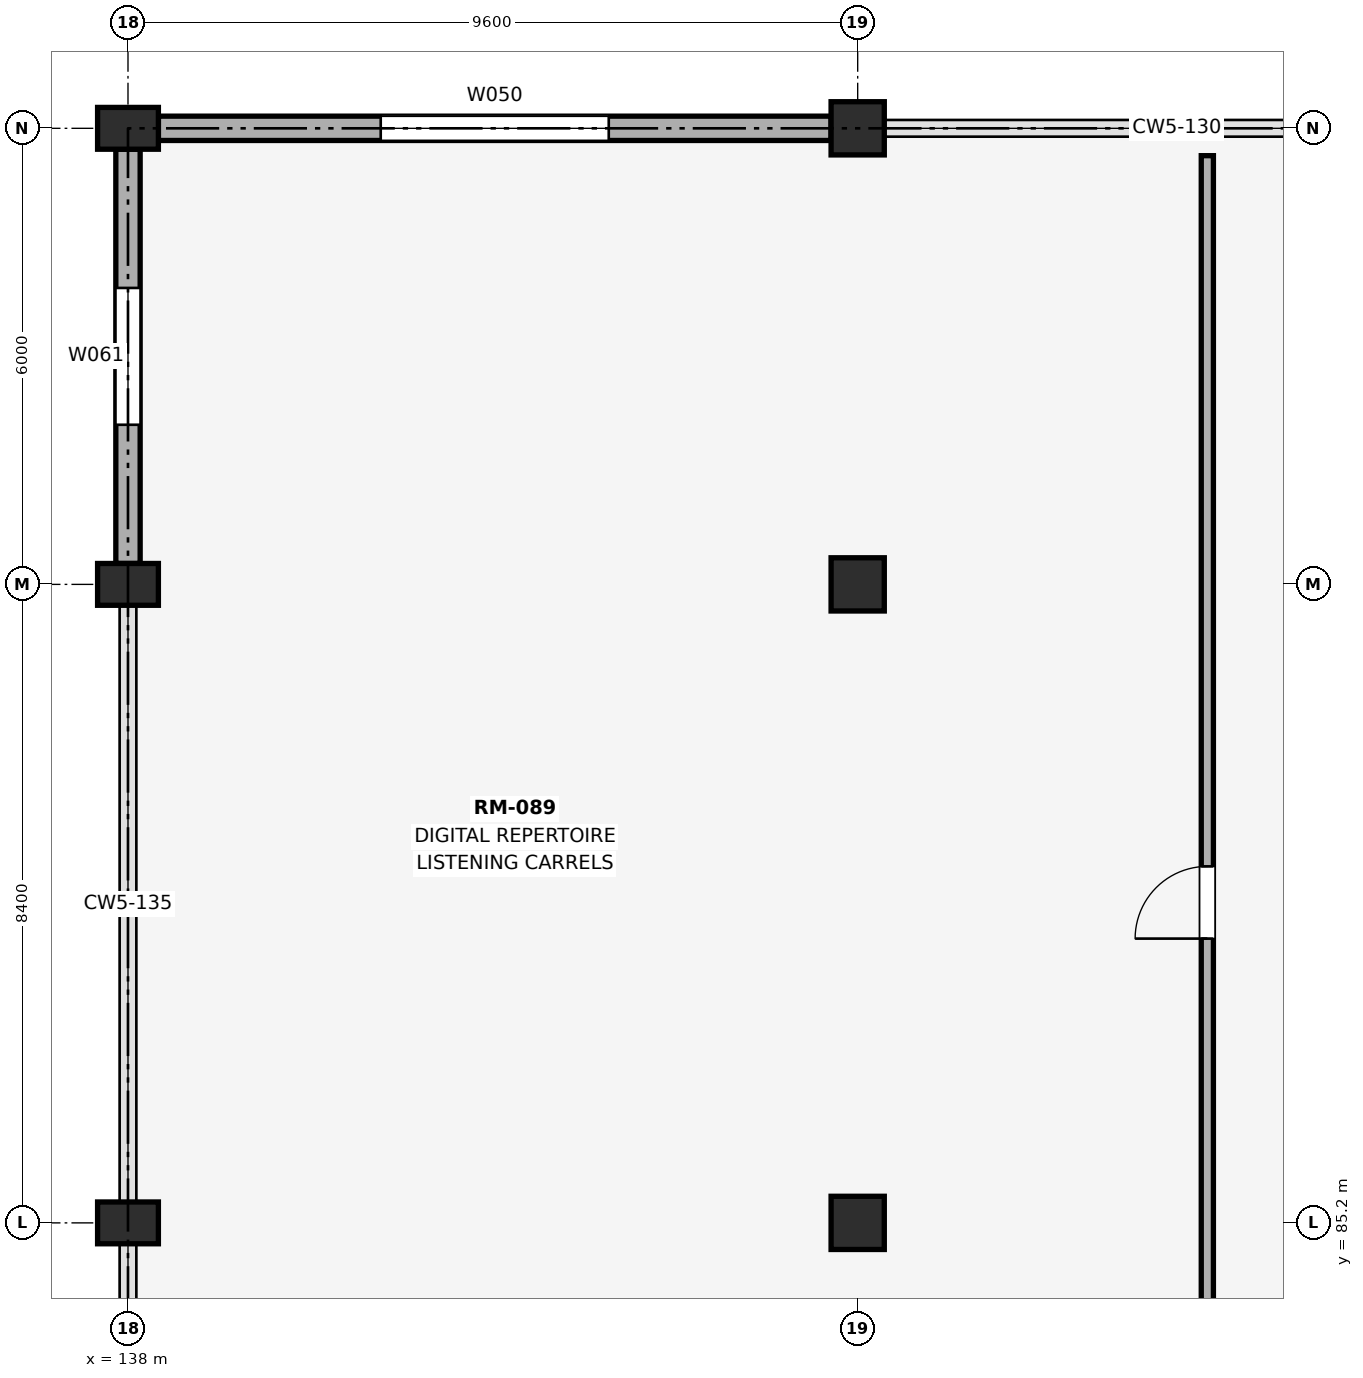
"""IFC4 building model, lengths in metres.
Left out: names, types, materials, properties, quantities, classifications, styles, units other than length and angle.
Written with IfcOpenShell. Run it as: python <this file> out.ifc"""

import sys

from ifc_helpers import new_model, si_unit, direction, frame, frame_2d, origin, origin_2d, place, context, subcontext, project, spatial, rectangle, extrude, element, fill, save


model = new_model("IFC4")
c1 = context("Model", 3, precision=1e-05, world=origin(), true_north=direction((0.0, 1.0)))
c2 = subcontext(c1, "Body", "Model", "MODEL_VIEW")
j1 = project(units=[si_unit("LENGTHUNIT", "METRE"), si_unit("PLANEANGLEUNIT", "RADIAN")], contexts=[c1])
p1 = place(None, origin())
s1 = spatial("IfcSite", under=j1, at=p1, CompositionType="ELEMENT")
p2 = place(p1, origin())
s2 = spatial("IfcBuilding", under=s1, at=p2, CompositionType="ELEMENT")
p3 = place(p2, frame((0.0, 0.0, 5.4)))
s3 = spatial("IfcBuildingStorey", under=s2, at=p3, CompositionType="ELEMENT", Elevation=5.4)
for number, where, z_axis, x_axis in (
    (1, (138.0, 85.2, 0.0), (0.0, 0.0, 1.0), (1.0, 0.0, 0.0)),
    (2, (138.0, 93.6, 0.0), (0.0, 0.0, 1.0), (1.0, 0.0, 0.0)),
    (3, (138.0, 99.6, 0.0), (0.0, 0.0, 1.0), (1.0, 0.0, 0.0)),
):
    element("IfcColumn", number, at=place(p3, frame(where, z_axis=z_axis, x_axis=x_axis)), inside=s3, PredefinedType="COLUMN", context=c2, shape_type="SweptSolid", body=[
        extrude(rectangle(XDim=0.8, YDim=0.55, at=origin_2d()), origin(), (0.0, 0.0, 1.0), 4.8),
    ])
for number, where, z_axis, x_axis in (
    (4, (147.6, 85.2, 0.0), (0.0, 0.0, 1.0), (1.0, 0.0, 0.0)),
    (5, (147.6, 93.6, 0.0), (0.0, 0.0, 1.0), (1.0, 0.0, 0.0)),
    (6, (147.6, 99.6, 0.0), (0.0, 0.0, 1.0), (1.0, 0.0, 0.0)),
):
    element("IfcColumn", number, at=place(p3, frame(where, z_axis=z_axis, x_axis=x_axis)), inside=s3, PredefinedType="COLUMN", context=c2, shape_type="SweptSolid", body=[
        extrude(rectangle(XDim=0.7, YDim=0.7, at=origin_2d()), origin(), (0.0, 0.0, 1.0), 4.8),
    ])
p4 = place(p3, frame((138.4, 99.6, 0.0), z_axis=(0.0, 0.0, 1.0), x_axis=(1.0, 0.0, 0.0)))
e7 = element("IfcWall", 7, at=p4, inside=s3, PredefinedType="SOLIDWALL", context=c2, shape_type="SweptSolid", body=[
    extrude(rectangle(XDim=8.85, YDim=0.32, at=frame_2d((4.425, 0.0))), origin(), (0.0, 0.0, 1.0), 3.48),
])
p5 = place(p4, frame((2.925, 0.0, 0.95)))
e8 = element("IfcOpeningElement", 8, at=p5, cuts=e7, PredefinedType="OPENING", context=c2, shape_type="SweptSolid", body=[
    extrude(rectangle(XDim=3.0, YDim=1.8, at=frame_2d((1.5, 0.9))), frame((0.0, 0.17, 0.0), z_axis=(0.0, -1.0, 0.0), x_axis=(1.0, 0.0, 0.0)), (0.0, 0.0, 1.0), 0.34),
])
p6 = place(p3, frame((138.0, 93.875, 0.0), z_axis=(0.0, 0.0, 1.0), x_axis=(0.0, 1.0, 0.0)))
e9 = element("IfcWall", 9, at=p6, inside=s3, PredefinedType="SOLIDWALL", context=c2, shape_type="SweptSolid", body=[
    extrude(rectangle(XDim=5.45, YDim=0.32, at=frame_2d((2.725, 0.0))), origin(), (0.0, 0.0, 1.0), 3.8),
])
p7 = place(p6, frame((1.825, 0.0, 0.9)))
e10 = element("IfcOpeningElement", 10, at=p7, cuts=e9, PredefinedType="OPENING", context=c2, shape_type="SweptSolid", body=[
    extrude(rectangle(XDim=1.8, YDim=1.8, at=frame_2d((0.9, 0.9))), frame((0.0, 0.17, 0.0), z_axis=(0.0, -1.0, 0.0), x_axis=(1.0, 0.0, 0.0)), (0.0, 0.0, 1.0), 0.34),
])
p8 = place(p3, frame((152.2, 69.94, 0.0), z_axis=(0.0, 0.0, 1.0), x_axis=(0.0, 1.0, 0.0)))
e11 = element("IfcWall", 11, at=p8, inside=s3, PredefinedType="PARTITIONING", context=c2, shape_type="SweptSolid", body=[
    extrude(rectangle(XDim=29.3, YDim=0.16, at=frame_2d((14.65, 0.0))), origin(), (0.0, 0.0, 1.0), 4.49),
])
p9 = place(p8, frame((6.0, 0.0, 0.0)))
e12 = element("IfcOpeningElement", 12, at=p9, cuts=e11, PredefinedType="OPENING", context=c2, shape_type="SweptSolid", body=[
    extrude(rectangle(XDim=1.02, YDim=2.18, at=frame_2d((0.51, 1.09))), frame((0.0, 0.09, 0.0), z_axis=(0.0, -1.0, 0.0), x_axis=(1.0, 0.0, 0.0)), (0.0, 0.0, 1.0), 0.18),
])
p10 = place(p8, frame((19.0, 0.0, 0.0)))
e13 = element("IfcOpeningElement", 13, at=p10, cuts=e11, PredefinedType="OPENING", context=c2, shape_type="SweptSolid", body=[
    extrude(rectangle(XDim=0.95, YDim=2.15, at=frame_2d((0.475, 1.075))), frame((0.0, 0.09, 0.0), z_axis=(0.0, -1.0, 0.0), x_axis=(1.0, 0.0, 0.0)), (0.0, 0.0, 1.0), 0.18),
])
p11 = place(p5, origin())
e14 = element("IfcWindow", 14, at=p11, inside=s3, PartitioningType="SINGLE_PANEL", PredefinedType="WINDOW", context=c2, shape_type="SweptSolid", body=[
    extrude(rectangle(XDim=3.0, YDim=1.8, at=frame_2d((1.5, 0.9))), frame((0.0, 0.03, 0.0), z_axis=(0.0, -1.0, 0.0), x_axis=(1.0, 0.0, 0.0)), (0.0, 0.0, 1.0), 0.06),
])
fill(e8, e14)
p12 = place(p7, origin())
e15 = element("IfcWindow", 15, at=p12, inside=s3, PartitioningType="SINGLE_PANEL", PredefinedType="WINDOW", context=c2, shape_type="SweptSolid", body=[
    extrude(rectangle(XDim=1.8, YDim=1.8, at=frame_2d((0.9, 0.9))), frame((0.0, 0.03, 0.0), z_axis=(0.0, -1.0, 0.0), x_axis=(1.0, 0.0, 0.0)), (0.0, 0.0, 1.0), 0.06),
])
fill(e10, e15)
p13 = place(p10, origin())
e16 = element("IfcDoor", 16, at=p13, inside=s3, OperationType="SINGLE_SWING_LEFT", PredefinedType="DOOR", context=c2, shape_type="SweptSolid", body=[
    extrude(rectangle(XDim=0.95, YDim=2.15, at=frame_2d((0.475, 1.075))), frame((0.0, 0.025, 0.0), z_axis=(0.0, -1.0, 0.0), x_axis=(1.0, 0.0, 0.0)), (0.0, 0.0, 1.0), 0.05),
])
fill(e13, e16)
save(model, sys.argv[1])
